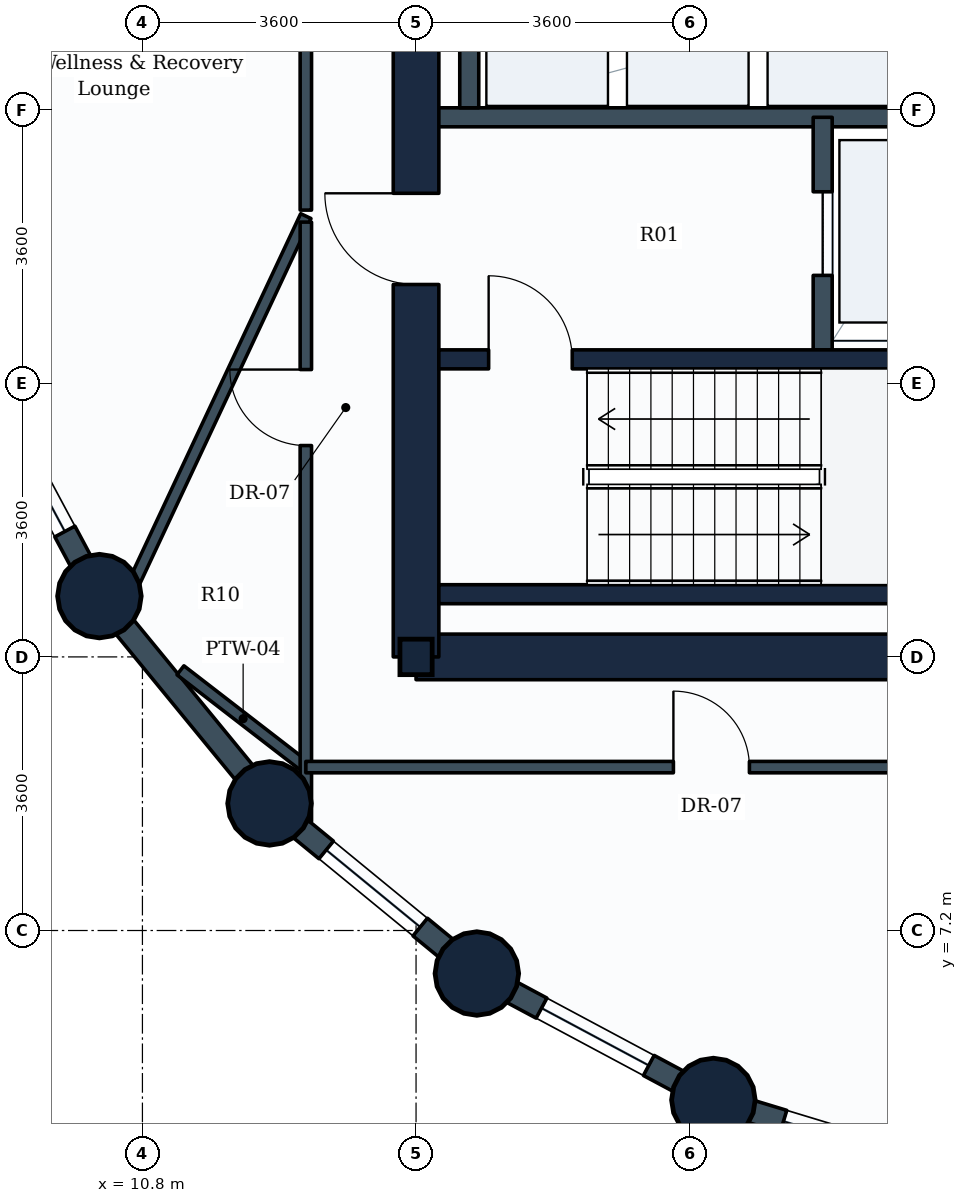
"""IFC4 building model, lengths in metres.
Left out: names, types, materials, properties, quantities, classifications, styles, units other than length and angle.
Written with IfcOpenShell. Run it as: python <this file> out.ifc"""

import sys

from ifc_helpers import new_model, si_unit, direction, frame, frame_2d, origin, origin_2d, place, context, subcontext, project, spatial, rectangle, circle, i_section, extrude, element, fill, save


model = new_model("IFC4")
c1 = context("Model", 3, precision=1e-05, world=origin(), true_north=direction((0.0, 1.0)))
c2 = subcontext(c1, "Body", "Model", "MODEL_VIEW")
j1 = project(units=[si_unit("LENGTHUNIT", "METRE"), si_unit("PLANEANGLEUNIT", "RADIAN")], contexts=[c1])
p1 = place(None, origin())
s1 = spatial("IfcSite", under=j1, at=p1, CompositionType="ELEMENT")
p2 = place(p1, origin())
s2 = spatial("IfcBuilding", under=s1, at=p2, CompositionType="ELEMENT")
p3 = place(p2, frame((0.0, 0.0, 55.2)))
s3 = spatial("IfcBuildingStorey", under=s2, at=p3, CompositionType="ELEMENT", Elevation=55.2)
for number, where, z_axis, x_axis in (
    (1, (10.234, 11.6, 0.0), (0.0, 0.0, 1.0), (1.0, 0.0, 0.0)),
    (2, (12.472, 8.872, 0.0), (0.0, 0.0, 1.0), (1.0, 0.0, 0.0)),
):
    element("IfcColumn", number, at=place(p3, frame(where, z_axis=z_axis, x_axis=x_axis)), inside=s3, PredefinedType="COLUMN", context=c2, shape_type="SweptSolid", body=[
        extrude(circle(Radius=0.55, at=origin_2d()), origin(), (0.0, 0.0, 1.0), 3.9),
    ])
p4 = place(p3, frame((14.4, 10.8, 0.0), z_axis=(0.0, 0.0, 1.0), x_axis=(1.0, 0.0, 0.0)))
e3 = element("IfcColumn", 3, at=p4, inside=s3, PredefinedType="COLUMN", context=c2, shape_type="SweptSolid", body=[
    extrude(i_section(OverallWidth=0.424, OverallDepth=0.467, WebThickness=0.033, FlangeThickness=0.053, FilletRadius=0.015, at=origin_2d()), origin(), (0.0, 0.0, 1.0), 3.9),
])
for number, where, z_axis, x_axis in (
    (4, (15.2, 6.634, 0.0), (0.0, 0.0, 1.0), (1.0, 0.0, 0.0)),
    (5, (18.312, 4.97, 0.0), (0.0, 0.0, 1.0), (1.0, 0.0, 0.0)),
):
    element("IfcColumn", number, at=place(p3, frame(where, z_axis=z_axis, x_axis=x_axis)), inside=s3, PredefinedType="COLUMN", context=c2, shape_type="SweptSolid", body=[
        extrude(circle(Radius=0.55, at=origin_2d()), origin(), (0.0, 0.0, 1.0), 3.9),
    ])
p5 = place(p3, frame((10.234, 11.6, 0.0), z_axis=(0.0, 0.0, 1.0), x_axis=(-0.47151087309, 0.881860247748, 0.0)))
e6 = element("IfcWall", 6, at=p5, inside=s3, PredefinedType="STANDARD", context=c2, shape_type="SweptSolid", body=[
    extrude(rectangle(XDim=3.529, YDim=0.3, at=frame_2d((1.764, 0.0))), origin(), (0.0, 0.0, 1.0), 2.93),
])
p6 = place(p5, frame((0.964, 0.0, 0.85)))
e7 = element("IfcOpeningElement", 7, at=p6, cuts=e6, PredefinedType="OPENING", context=c2, shape_type="SweptSolid", body=[
    extrude(rectangle(XDim=1.6, YDim=1.35, at=frame_2d((0.8, 0.675))), frame((0.0, 0.16, 0.0), z_axis=(0.0, -1.0, 0.0), x_axis=(1.0, 0.0, 0.0)), (0.0, 0.0, 1.0), 0.32),
])
p7 = place(p3, frame((12.472, 8.872, 0.0), z_axis=(0.0, 0.0, 1.0), x_axis=(-0.634258295121, 0.773121216285, 0.0)))
e8 = element("IfcWall", 8, at=p7, inside=s3, PredefinedType="STANDARD", context=c2, shape_type="SweptSolid", body=[
    extrude(rectangle(XDim=3.529, YDim=0.3, at=frame_2d((1.764, 0.0))), origin(), (0.0, 0.0, 1.0), 2.93),
])
p8 = place(p3, frame((15.2, 6.634, 0.0), z_axis=(0.0, 0.0, 1.0), x_axis=(-0.773121216285, 0.634258295121, 0.0)))
e9 = element("IfcWall", 9, at=p8, inside=s3, PredefinedType="STANDARD", context=c2, shape_type="SweptSolid", body=[
    extrude(rectangle(XDim=3.529, YDim=0.3, at=frame_2d((1.764, 0.0))), origin(), (0.0, 0.0, 1.0), 2.93),
])
p9 = place(p8, frame((0.964, 0.0, 0.85)))
e10 = element("IfcOpeningElement", 10, at=p9, cuts=e9, PredefinedType="OPENING", context=c2, shape_type="SweptSolid", body=[
    extrude(rectangle(XDim=1.6, YDim=1.35, at=frame_2d((0.8, 0.675))), frame((0.0, 0.16, 0.0), z_axis=(0.0, -1.0, 0.0), x_axis=(1.0, 0.0, 0.0)), (0.0, 0.0, 1.0), 0.32),
])
p10 = place(p3, frame((18.312, 4.97, 0.0), z_axis=(0.0, 0.0, 1.0), x_axis=(-0.881846862014, 0.471535907389, 0.0)))
e11 = element("IfcWall", 11, at=p10, inside=s3, PredefinedType="STANDARD", context=c2, shape_type="SweptSolid", body=[
    extrude(rectangle(XDim=3.529, YDim=0.3, at=frame_2d((1.765, 0.0))), origin(), (0.0, 0.0, 1.0), 2.93),
])
p11 = place(p10, frame((0.964, 0.0, 0.85)))
e12 = element("IfcOpeningElement", 12, at=p11, cuts=e11, PredefinedType="OPENING", context=c2, shape_type="SweptSolid", body=[
    extrude(rectangle(XDim=1.6, YDim=1.35, at=frame_2d((0.8, 0.675))), frame((0.0, 0.16, 0.0), z_axis=(0.0, -1.0, 0.0), x_axis=(1.0, 0.0, 0.0)), (0.0, 0.0, 1.0), 0.32),
])
p12 = place(p3, frame((21.688, 3.946, 0.0), z_axis=(0.0, 0.0, 1.0), x_axis=(-0.956953367403, 0.290241714123, 0.0)))
e13 = element("IfcWall", 13, at=p12, inside=s3, PredefinedType="STANDARD", context=c2, shape_type="SweptSolid", body=[
    extrude(rectangle(XDim=3.528, YDim=0.3, at=frame_2d((1.764, 0.0))), origin(), (0.0, 0.0, 1.0), 2.93),
])
p13 = place(p12, frame((0.964, 0.0, 0.85)))
e14 = element("IfcOpeningElement", 14, at=p13, cuts=e13, PredefinedType="OPENING", context=c2, shape_type="SweptSolid", body=[
    extrude(rectangle(XDim=1.6, YDim=1.35, at=frame_2d((0.8, 0.675))), frame((0.0, 0.16, 0.0), z_axis=(0.0, -1.0, 0.0), x_axis=(1.0, 0.0, 0.0)), (0.0, 0.0, 1.0), 0.32),
])
p14 = place(p3, frame((14.4, 10.8, 0.0), z_axis=(0.0, 0.0, 1.0), x_axis=(1.0, 0.0, 0.0)))
e15 = element("IfcWall", 15, at=p14, inside=s3, PredefinedType="SHEAR", context=c2, shape_type="SweptSolid", body=[
    extrude(rectangle(XDim=18.0, YDim=0.6, at=frame_2d((9.0, 0.0))), origin(), (0.0, 0.0, 1.0), 3.65),
])
p15 = place(p3, frame((14.4, 10.8, 0.0), z_axis=(0.0, 0.0, 1.0), x_axis=(0.0, 1.0, 0.0)))
e16 = element("IfcWall", 16, at=p15, inside=s3, PredefinedType="SHEAR", context=c2, shape_type="SweptSolid", body=[
    extrude(rectangle(XDim=14.4, YDim=0.6, at=frame_2d((7.2, 0.0))), origin(), (0.0, 0.0, 1.0), 3.65),
])
p16 = place(p15, frame((11.05, 0.0, 0.0)))
e17 = element("IfcOpeningElement", 17, at=p16, cuts=e16, PredefinedType="OPENING", context=c2, shape_type="SweptSolid", body=[
    extrude(rectangle(XDim=1.1, YDim=2.1, at=frame_2d((0.55, 1.05))), frame((0.0, 0.31, 0.0), z_axis=(0.0, -1.0, 0.0), x_axis=(1.0, 0.0, 0.0)), (0.0, 0.0, 1.0), 0.62),
])
p17 = place(p15, frame((4.9, 0.0, 0.0)))
e18 = element("IfcOpeningElement", 18, at=p17, cuts=e16, PredefinedType="OPENING", context=c2, shape_type="SweptSolid", body=[
    extrude(rectangle(XDim=1.2, YDim=2.1, at=frame_2d((0.6, 1.05))), frame((0.0, 0.31, 0.0), z_axis=(0.0, -1.0, 0.0), x_axis=(1.0, 0.0, 0.0)), (0.0, 0.0, 1.0), 0.62),
])
p18 = place(p3, frame((14.7, 11.625, 0.0), z_axis=(0.0, 0.0, 1.0), x_axis=(1.0, 0.0, 0.0)))
e19 = element("IfcWall", 19, at=p18, inside=s3, PredefinedType="SHEAR", context=c2, shape_type="SweptSolid", body=[
    extrude(rectangle(XDim=8.65, YDim=0.25, at=frame_2d((4.325, 0.0))), origin(), (0.0, 0.0, 1.0), 3.65),
])
p19 = place(p3, frame((14.7, 14.715, 0.0), z_axis=(0.0, 0.0, 1.0), x_axis=(1.0, 0.0, 0.0)))
e20 = element("IfcWall", 20, at=p19, inside=s3, PredefinedType="SHEAR", context=c2, shape_type="SweptSolid", body=[
    extrude(rectangle(XDim=8.65, YDim=0.25, at=frame_2d((4.325, 0.0))), origin(), (0.0, 0.0, 1.0), 3.65),
])
p20 = place(p19, frame((0.655, 0.0, 0.0)))
e21 = element("IfcOpeningElement", 21, at=p20, cuts=e20, PredefinedType="OPENING", context=c2, shape_type="SweptSolid", body=[
    extrude(rectangle(XDim=1.1, YDim=2.1, at=frame_2d((0.55, 1.05))), frame((0.0, 0.135, 0.0), z_axis=(0.0, -1.0, 0.0), x_axis=(1.0, 0.0, 0.0)), (0.0, 0.0, 1.0), 0.27),
])
p21 = place(p3, frame((14.65, 17.9, 0.0), z_axis=(0.0, 0.0, 1.0), x_axis=(1.0, 0.0, 0.0)))
e22 = element("IfcWall", 22, at=p21, inside=s3, PredefinedType="PARTITIONING", context=c2, shape_type="SweptSolid", body=[
    extrude(rectangle(XDim=7.15, YDim=0.25, at=frame_2d((3.575, 0.0))), origin(), (0.0, 0.0, 1.0), 3.635),
])
p22 = place(p3, frame((19.75, 14.84, 0.0), z_axis=(0.0, 0.0, 1.0), x_axis=(0.0, 1.0, 0.0)))
e23 = element("IfcWall", 23, at=p22, inside=s3, PredefinedType="PARTITIONING", context=c2, shape_type="SweptSolid", body=[
    extrude(rectangle(XDim=3.06, YDim=0.25, at=frame_2d((1.53, 0.0))), origin(), (0.0, 0.0, 1.0), 3.635),
])
p23 = place(p22, frame((0.98, 0.0, 0.0)))
e24 = element("IfcOpeningElement", 24, at=p23, cuts=e23, PredefinedType="OPENING", context=c2, shape_type="SweptSolid", body=[
    extrude(rectangle(XDim=1.1, YDim=2.1, at=frame_2d((0.55, 1.05))), frame((0.0, 0.135, 0.0), z_axis=(0.0, -1.0, 0.0), x_axis=(1.0, 0.0, 0.0)), (0.0, 0.0, 1.0), 0.27),
])
p24 = place(p3, frame((15.1, 18.025, 0.0), z_axis=(0.0, 0.0, 1.0), x_axis=(0.0, 1.0, 0.0)))
e25 = element("IfcWall", 25, at=p24, inside=s3, PredefinedType="PARTITIONING", context=c2, shape_type="SweptSolid", body=[
    extrude(rectangle(XDim=1.975, YDim=0.25, at=frame_2d((0.988, 0.0))), origin(), (0.0, 0.0, 1.0), 3.635),
])
p25 = place(p3, frame((12.95, 9.35, 0.0), z_axis=(0.0, 0.0, 1.0), x_axis=(-0.791573423038, 0.611074067474, 0.0)))
e26 = element("IfcWall", 26, at=p25, inside=s3, PredefinedType="PARTITIONING", context=c2, shape_type="SweptSolid", body=[
    extrude(rectangle(XDim=2.084, YDim=0.15, at=frame_2d((1.042, 0.0))), origin(), (0.0, 0.0, 1.0), 2.93),
])
p26 = place(p3, frame((12.95, 16.6, 0.0), z_axis=(0.0, 0.0, 1.0), x_axis=(-0.424335060038, -0.905505249473, 0.0)))
e27 = element("IfcWall", 27, at=p26, inside=s3, PredefinedType="PARTITIONING", context=c2, shape_type="SweptSolid", body=[
    extrude(rectangle(XDim=5.76, YDim=0.15, at=frame_2d((2.88, 0.0))), origin(), (0.0, 0.0, 1.0), 2.93),
])
p27 = place(p3, frame((12.95, 16.679, 0.0), z_axis=(0.0, 0.0, 1.0), x_axis=(0.0, 1.0, 0.0)))
e28 = element("IfcWall", 28, at=p27, inside=s3, PredefinedType="PARTITIONING", context=c2, shape_type="SweptSolid", body=[
    extrude(rectangle(XDim=8.442, YDim=0.15, at=frame_2d((4.221, 0.0))), origin(), (0.0, 0.0, 1.0), 3.08),
])
p28 = place(p27, frame((3.721, 0.0, 0.0)))
e29 = element("IfcOpeningElement", 29, at=p28, cuts=e28, PredefinedType="OPENING", context=c2, shape_type="SweptSolid", body=[
    extrude(rectangle(XDim=1.0, YDim=2.1, at=frame_2d((0.5, 1.05))), frame((0.0, 0.085, 0.0), z_axis=(0.0, -1.0, 0.0), x_axis=(1.0, 0.0, 0.0)), (0.0, 0.0, 1.0), 0.17),
])
p29 = place(p3, frame((12.95, 8.634, 0.0), z_axis=(0.0, 0.0, 1.0), x_axis=(0.0, 1.0, 0.0)))
e30 = element("IfcWall", 30, at=p29, inside=s3, PredefinedType="PARTITIONING", context=c2, shape_type="SweptSolid", body=[
    extrude(rectangle(XDim=7.887, YDim=0.15, at=frame_2d((3.944, 0.0))), origin(), (0.0, 0.0, 1.0), 2.93),
])
p30 = place(p29, frame((4.947, 0.0, 0.0)))
e31 = element("IfcOpeningElement", 31, at=p30, cuts=e30, PredefinedType="OPENING", context=c2, shape_type="SweptSolid", body=[
    extrude(rectangle(XDim=1.0, YDim=2.1, at=frame_2d((0.5, 1.05))), frame((0.0, 0.085, 0.0), z_axis=(0.0, -1.0, 0.0), x_axis=(1.0, 0.0, 0.0)), (0.0, 0.0, 1.0), 0.17),
])
p31 = place(p3, frame((12.95, 9.35, 0.0), z_axis=(0.0, 0.0, 1.0), x_axis=(1.0, 0.0, 0.0)))
e32 = element("IfcWall", 32, at=p31, inside=s3, PredefinedType="PARTITIONING", context=c2, shape_type="SweptSolid", body=[
    extrude(rectangle(XDim=15.771, YDim=0.15, at=frame_2d((7.885, 0.0))), origin(), (0.0, 0.0, 1.0), 3.04),
])
p32 = place(p31, frame((4.836, 0.0, 0.0)))
e33 = element("IfcOpeningElement", 33, at=p32, cuts=e32, PredefinedType="OPENING", context=c2, shape_type="SweptSolid", body=[
    extrude(rectangle(XDim=1.0, YDim=2.1, at=frame_2d((0.5, 1.05))), frame((0.0, 0.085, 0.0), z_axis=(0.0, -1.0, 0.0), x_axis=(1.0, 0.0, 0.0)), (0.0, 0.0, 1.0), 0.17),
])
p33 = place(p6, origin())
e34 = element("IfcWindow", 34, at=p33, inside=s3, PartitioningType="SINGLE_PANEL", PredefinedType="WINDOW", context=c2, shape_type="SweptSolid", body=[
    extrude(rectangle(XDim=1.6, YDim=1.35, at=frame_2d((0.8, 0.675))), frame((0.0, 0.03, 0.0), z_axis=(0.0, -1.0, 0.0), x_axis=(1.0, 0.0, 0.0)), (0.0, 0.0, 1.0), 0.06),
])
fill(e7, e34)
p34 = place(p9, origin())
e35 = element("IfcWindow", 35, at=p34, inside=s3, PartitioningType="SINGLE_PANEL", PredefinedType="WINDOW", context=c2, shape_type="SweptSolid", body=[
    extrude(rectangle(XDim=1.6, YDim=1.35, at=frame_2d((0.8, 0.675))), frame((0.0, 0.03, 0.0), z_axis=(0.0, -1.0, 0.0), x_axis=(1.0, 0.0, 0.0)), (0.0, 0.0, 1.0), 0.06),
])
fill(e10, e35)
p35 = place(p11, origin())
e36 = element("IfcWindow", 36, at=p35, inside=s3, PartitioningType="SINGLE_PANEL", PredefinedType="WINDOW", context=c2, shape_type="SweptSolid", body=[
    extrude(rectangle(XDim=1.6, YDim=1.35, at=frame_2d((0.8, 0.675))), frame((0.0, 0.03, 0.0), z_axis=(0.0, -1.0, 0.0), x_axis=(1.0, 0.0, 0.0)), (0.0, 0.0, 1.0), 0.06),
])
fill(e12, e36)
p36 = place(p13, origin())
e37 = element("IfcWindow", 37, at=p36, inside=s3, PartitioningType="SINGLE_PANEL", PredefinedType="WINDOW", context=c2, shape_type="SweptSolid", body=[
    extrude(rectangle(XDim=1.6, YDim=1.35, at=frame_2d((0.8, 0.675))), frame((0.0, 0.03, 0.0), z_axis=(0.0, -1.0, 0.0), x_axis=(1.0, 0.0, 0.0)), (0.0, 0.0, 1.0), 0.06),
])
fill(e14, e37)
p37 = place(p20, origin())
e38 = element("IfcDoor", 38, at=p37, inside=s3, OperationType="SINGLE_SWING_LEFT", PredefinedType="DOOR", context=c2, shape_type="SweptSolid", body=[
    extrude(rectangle(XDim=1.1, YDim=2.1, at=frame_2d((0.55, 1.05))), frame((0.0, 0.025, 0.0), z_axis=(0.0, -1.0, 0.0), x_axis=(1.0, 0.0, 0.0)), (0.0, 0.0, 1.0), 0.05),
])
fill(e21, e38)
p38 = place(p23, origin())
e39 = element("IfcDoor", 39, at=p38, inside=s3, OperationType="SLIDING_TO_LEFT", PredefinedType="DOOR", context=c2, shape_type="SweptSolid", body=[
    extrude(rectangle(XDim=1.1, YDim=2.1, at=frame_2d((0.55, 1.05))), frame((0.0, 0.025, 0.0), z_axis=(0.0, -1.0, 0.0), x_axis=(1.0, 0.0, 0.0)), (0.0, 0.0, 1.0), 0.05),
])
fill(e24, e39)
p39 = place(p17, origin())
e40 = element("IfcDoor", 40, at=p39, inside=s3, OperationType="SINGLE_SWING_RIGHT", PredefinedType="DOOR", context=c2, shape_type="SweptSolid", body=[
    extrude(rectangle(XDim=1.2, YDim=2.1, at=frame_2d((0.6, 1.05))), frame((0.0, 0.025, 0.0), z_axis=(0.0, -1.0, 0.0), x_axis=(1.0, 0.0, 0.0)), (0.0, 0.0, 1.0), 0.05),
])
fill(e18, e40)
p40 = place(p30, origin())
e41 = element("IfcDoor", 41, at=p40, inside=s3, OperationType="SINGLE_SWING_RIGHT", PredefinedType="DOOR", context=c2, shape_type="SweptSolid", body=[
    extrude(rectangle(XDim=1.0, YDim=2.1, at=frame_2d((0.5, 1.05))), frame((0.0, 0.025, 0.0), z_axis=(0.0, -1.0, 0.0), x_axis=(1.0, 0.0, 0.0)), (0.0, 0.0, 1.0), 0.05),
])
fill(e31, e41)
p41 = place(p32, origin())
e42 = element("IfcDoor", 42, at=p41, inside=s3, OperationType="SINGLE_SWING_LEFT", PredefinedType="DOOR", context=c2, shape_type="SweptSolid", body=[
    extrude(rectangle(XDim=1.0, YDim=2.1, at=frame_2d((0.5, 1.05))), frame((0.0, 0.025, 0.0), z_axis=(0.0, -1.0, 0.0), x_axis=(1.0, 0.0, 0.0)), (0.0, 0.0, 1.0), 0.05),
])
fill(e33, e42)
save(model, sys.argv[1])
